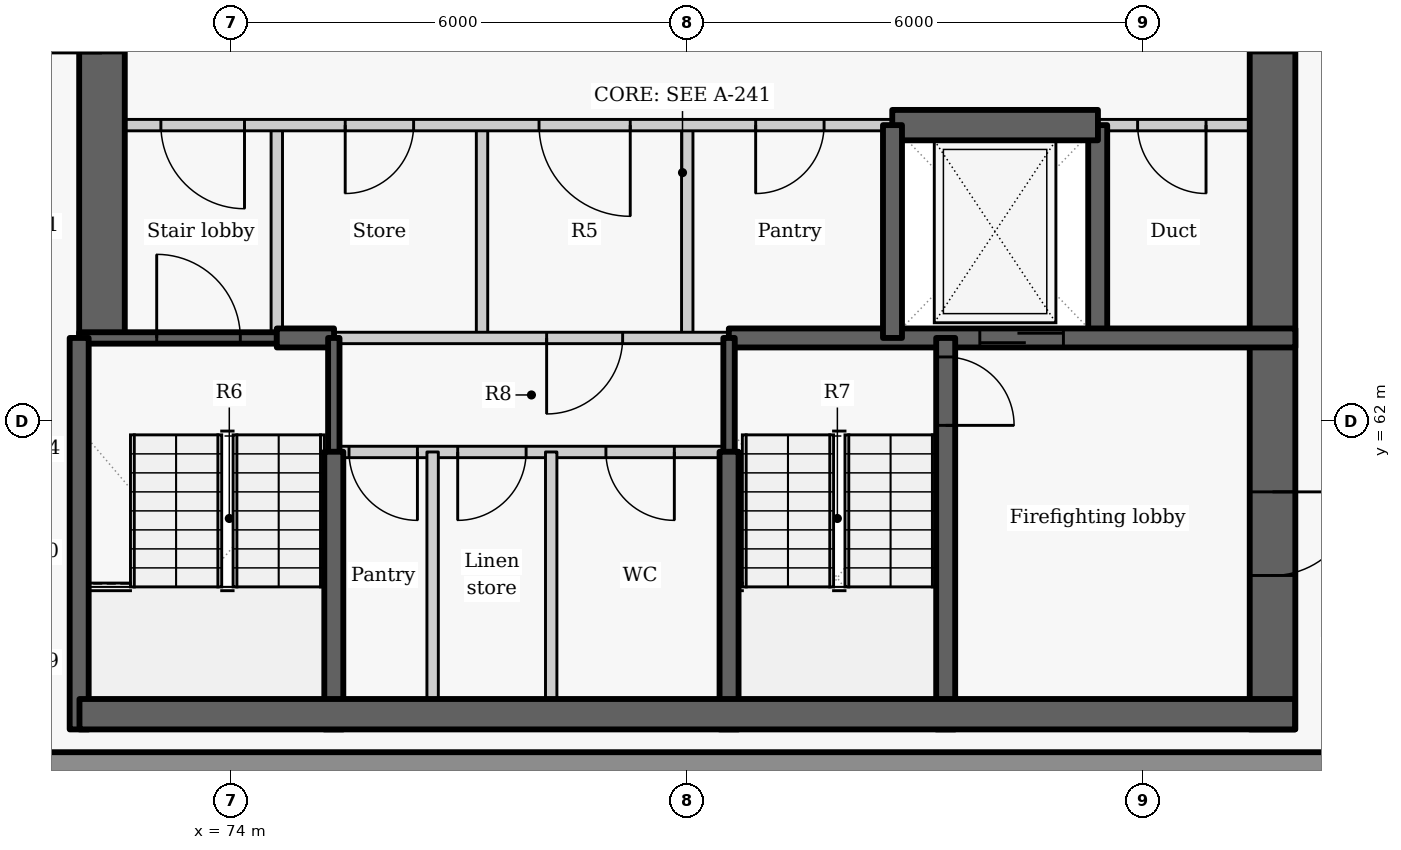
"""IFC4 building model, lengths in metres.
Left out: names, types, materials, properties, quantities, classifications, styles, units other than length and angle.
Written with IfcOpenShell. Run it as: python <this file> out.ifc"""

import sys

from ifc_helpers import new_model, si_unit, direction, frame, frame_2d, origin, place, context, subcontext, project, spatial, rectangle, extrude, element, fill, save


model = new_model("IFC4")
c1 = context("Model", 3, precision=1e-05, world=origin(), true_north=direction((0.0, 1.0)))
c2 = subcontext(c1, "Body", "Model", "MODEL_VIEW")
j1 = project(units=[si_unit("LENGTHUNIT", "METRE"), si_unit("PLANEANGLEUNIT", "RADIAN")], contexts=[c1])
p1 = place(None, origin())
s1 = spatial("IfcSite", under=j1, at=p1, CompositionType="ELEMENT")
p2 = place(p1, origin())
s2 = spatial("IfcBuilding", under=s1, at=p2, CompositionType="ELEMENT")
p3 = place(p2, frame((0.0, 0.0, 239.4)))
s3 = spatial("IfcBuildingStorey", under=s2, at=p3, CompositionType="ELEMENT", Elevation=239.4)
p4 = place(p3, frame((70.501, 57.5, 0.0), z_axis=(0.0, 0.0, 1.0), x_axis=(1.0, 0.0, 0.0)))
e1 = element("IfcWall", 1, at=p4, inside=s3, PredefinedType="SOLIDWALL", context=c2, shape_type="SweptSolid", body=[
    extrude(rectangle(XDim=18.993, YDim=0.3, at=frame_2d((9.496, 0.0))), origin(), (0.0, 0.0, 1.0), 2.425),
])
p5 = place(p3, frame((74.6, 63.1, 0.0), z_axis=(0.0, 0.0, 1.0), x_axis=(0.0, 1.0, 0.0)))
e2 = element("IfcWall", 2, at=p5, inside=s3, PredefinedType="PARTITIONING", context=c2, shape_type="SweptSolid", body=[
    extrude(rectangle(XDim=2.8, YDim=0.15, at=frame_2d((1.4, 0.0))), origin(), (0.0, 0.0, 1.0), 3.025),
])
p6 = place(p3, frame((72.3, 63.1, -0.275), z_axis=(0.0, 0.0, 1.0), x_axis=(0.0, 1.0, 0.0)))
e3 = element("IfcWall", 3, at=p6, inside=s3, PredefinedType="SHEAR", context=c2, shape_type="SweptSolid", body=[
    extrude(rectangle(XDim=9.1, YDim=0.6, at=frame_2d((4.55, 0.0))), origin(), (0.0, 0.0, 1.0), 3.3),
])
p7 = place(p6, frame((3.75, 0.0, 0.275)))
e4 = element("IfcOpeningElement", 4, at=p7, cuts=e3, PredefinedType="OPENING", context=c2, shape_type="SweptSolid", body=[
    extrude(rectangle(XDim=1.5, YDim=2.1, at=frame_2d((0.75, 1.05))), frame((0.0, 0.31, 0.0), z_axis=(0.0, -1.0, 0.0), x_axis=(1.0, 0.0, 0.0)), (0.0, 0.0, 1.0), 0.62),
])
p8 = place(p3, frame((85.4, 63.1, -0.275), z_axis=(0.0, 0.0, 1.0), x_axis=(0.0, 1.0, 0.0)))
e5 = element("IfcWall", 5, at=p8, inside=s3, PredefinedType="SHEAR", context=c2, shape_type="SweptSolid", body=[
    extrude(rectangle(XDim=2.8, YDim=0.25, at=frame_2d((1.4, 0.0))), origin(), (0.0, 0.0, 1.0), 3.3),
])
p9 = place(p3, frame((87.7, 72.2, -0.275), z_axis=(0.0, 0.0, 1.0), x_axis=(0.0, -1.0, 0.0)))
e6 = element("IfcWall", 6, at=p9, inside=s3, PredefinedType="SHEAR", context=c2, shape_type="SweptSolid", body=[
    extrude(rectangle(XDim=14.25, YDim=0.6, at=frame_2d((7.125, 0.0))), origin(), (0.0, 0.0, 1.0), 3.3),
])
p10 = place(p9, frame((3.85, 0.0, 0.275)))
e7 = element("IfcOpeningElement", 7, at=p10, cuts=e6, PredefinedType="OPENING", context=c2, shape_type="SweptSolid", body=[
    extrude(rectangle(XDim=1.5, YDim=2.1, at=frame_2d((0.75, 1.05))), frame((0.0, 0.31, 0.0), z_axis=(0.0, -1.0, 0.0), x_axis=(1.0, 0.0, 0.0)), (0.0, 0.0, 1.0), 0.62),
])
p11 = place(p9, frame((11.125, 0.0, 0.275)))
e8 = element("IfcOpeningElement", 8, at=p11, cuts=e6, PredefinedType="OPENING", context=c2, shape_type="SweptSolid", body=[
    extrude(rectangle(XDim=1.1, YDim=2.1, at=frame_2d((0.55, 1.05))), frame((0.0, 0.31, 0.0), z_axis=(0.0, -1.0, 0.0), x_axis=(1.0, 0.0, 0.0)), (0.0, 0.0, 1.0), 0.62),
])
for number, where, z_axis, x_axis in (
    (9, (77.3, 63.1, 0.0), (0.0, 0.0, 1.0), (0.0, 1.0, 0.0)),
    (10, (80.0, 63.1, 0.0), (0.0, 0.0, 1.0), (0.0, 1.0, 0.0)),
):
    element("IfcWall", number, at=place(p3, frame(where, z_axis=z_axis, x_axis=x_axis)), inside=s3, PredefinedType="PARTITIONING", context=c2, shape_type="SweptSolid", body=[
        extrude(rectangle(XDim=2.8, YDim=0.15, at=frame_2d((1.4, 0.0))), origin(), (0.0, 0.0, 1.0), 3.025),
    ])
p12 = place(p3, frame((82.703, 65.9, 0.0), z_axis=(0.0, 0.0, 1.0), x_axis=(-1.0, 0.0, 0.0)))
e11 = element("IfcWall", 11, at=p12, inside=s3, PredefinedType="PARTITIONING", context=c2, shape_type="SweptSolid", body=[
    extrude(rectangle(XDim=10.703, YDim=0.15, at=frame_2d((5.352, 0.0))), origin(), (0.0, 0.0, 1.0), 3.025),
])
p13 = place(p12, frame((8.528, 0.0, 0.0)))
e12 = element("IfcOpeningElement", 12, at=p13, cuts=e11, PredefinedType="OPENING", context=c2, shape_type="SweptSolid", body=[
    extrude(rectangle(XDim=1.1, YDim=2.1, at=frame_2d((0.55, 1.05))), frame((0.0, 0.085, 0.0), z_axis=(0.0, -1.0, 0.0), x_axis=(1.0, 0.0, 0.0)), (0.0, 0.0, 1.0), 0.17),
])
p14 = place(p12, frame((6.303, 0.0, 0.0)))
e13 = element("IfcOpeningElement", 13, at=p14, cuts=e11, PredefinedType="OPENING", context=c2, shape_type="SweptSolid", body=[
    extrude(rectangle(XDim=0.9, YDim=2.1, at=frame_2d((0.45, 1.05))), frame((0.0, 0.085, 0.0), z_axis=(0.0, -1.0, 0.0), x_axis=(1.0, 0.0, 0.0)), (0.0, 0.0, 1.0), 0.17),
])
p15 = place(p12, frame((3.453, 0.0, 0.0)))
e14 = element("IfcOpeningElement", 14, at=p15, cuts=e11, PredefinedType="OPENING", context=c2, shape_type="SweptSolid", body=[
    extrude(rectangle(XDim=1.2, YDim=2.1, at=frame_2d((0.6, 1.05))), frame((0.0, 0.085, 0.0), z_axis=(0.0, -1.0, 0.0), x_axis=(1.0, 0.0, 0.0)), (0.0, 0.0, 1.0), 0.17),
])
p16 = place(p12, frame((0.903, 0.0, 0.0)))
e15 = element("IfcOpeningElement", 15, at=p16, cuts=e11, PredefinedType="OPENING", context=c2, shape_type="SweptSolid", body=[
    extrude(rectangle(XDim=0.9, YDim=2.1, at=frame_2d((0.45, 1.05))), frame((0.0, 0.085, 0.0), z_axis=(0.0, -1.0, 0.0), x_axis=(1.0, 0.0, 0.0)), (0.0, 0.0, 1.0), 0.17),
])
p17 = place(p3, frame((88.0, 65.9, 0.0), z_axis=(0.0, 0.0, 1.0), x_axis=(-1.0, 0.0, 0.0)))
e16 = element("IfcWall", 16, at=p17, inside=s3, PredefinedType="PARTITIONING", context=c2, shape_type="SweptSolid", body=[
    extrude(rectangle(XDim=2.603, YDim=0.15, at=frame_2d((1.302, 0.0))), origin(), (0.0, 0.0, 1.0), 3.025),
])
p18 = place(p17, frame((1.175, 0.0, 0.0)))
e17 = element("IfcOpeningElement", 17, at=p18, cuts=e16, PredefinedType="OPENING", context=c2, shape_type="SweptSolid", body=[
    extrude(rectangle(XDim=0.9, YDim=2.1, at=frame_2d((0.45, 1.05))), frame((0.0, 0.085, 0.0), z_axis=(0.0, -1.0, 0.0), x_axis=(1.0, 0.0, 0.0)), (0.0, 0.0, 1.0), 0.17),
])
p19 = place(p3, frame((82.697, 65.9, -0.275), z_axis=(0.0, 0.0, 1.0), x_axis=(1.0, 0.0, 0.0)))
e18 = element("IfcWall", 18, at=p19, inside=s3, PredefinedType="SHEAR", context=c2, shape_type="SweptSolid", body=[
    extrude(rectangle(XDim=2.706, YDim=0.4, at=frame_2d((1.353, 0.0))), origin(), (0.0, 0.0, 1.0), 3.3),
])
p20 = place(p3, frame((72.0, 63.1, -0.275), z_axis=(0.0, 0.0, 1.0), x_axis=(1.0, 0.0, 0.0)))
e19 = element("IfcWall", 19, at=p20, inside=s3, PredefinedType="SHEAR", context=c2, shape_type="SweptSolid", body=[
    extrude(rectangle(XDim=2.6, YDim=0.15, at=frame_2d((1.3, 0.0))), origin(), (0.0, 0.0, 1.0), 3.3),
])
p21 = place(p20, frame((1.02, 0.0, 0.275)))
e20 = element("IfcOpeningElement", 20, at=p21, cuts=e19, PredefinedType="OPENING", context=c2, shape_type="SweptSolid", body=[
    extrude(rectangle(XDim=1.1, YDim=2.1, at=frame_2d((0.55, 1.05))), frame((0.0, 0.085, 0.0), z_axis=(0.0, -1.0, 0.0), x_axis=(1.0, 0.0, 0.0)), (0.0, 0.0, 1.0), 0.17),
])
p22 = place(p3, frame((74.6, 63.1, -0.275), z_axis=(0.0, 0.0, 1.0), x_axis=(1.0, 0.0, 0.0)))
e21 = element("IfcWall", 21, at=p22, inside=s3, PredefinedType="SHEAR", context=c2, shape_type="SweptSolid", body=[
    extrude(rectangle(XDim=0.753, YDim=0.25, at=frame_2d((0.376, 0.0))), origin(), (0.0, 0.0, 1.0), 3.3),
])
p23 = place(p3, frame((80.547, 63.1, -0.275), z_axis=(0.0, 0.0, 1.0), x_axis=(1.0, 0.0, 0.0)))
e22 = element("IfcWall", 22, at=p23, inside=s3, PredefinedType="SHEAR", context=c2, shape_type="SweptSolid", body=[
    extrude(rectangle(XDim=7.453, YDim=0.25, at=frame_2d((3.727, 0.0))), origin(), (0.0, 0.0, 1.0), 3.3),
])
p24 = place(p23, frame((3.302, 0.0, 0.275)))
e23 = element("IfcOpeningElement", 23, at=p24, cuts=e22, PredefinedType="OPENING", context=c2, shape_type="SweptSolid", body=[
    extrude(rectangle(XDim=1.1, YDim=2.1, at=frame_2d((0.55, 1.05))), frame((0.0, 0.135, 0.0), z_axis=(0.0, -1.0, 0.0), x_axis=(1.0, 0.0, 0.0)), (0.0, 0.0, 1.0), 0.27),
])
p25 = place(p3, frame((80.553, 63.1, 0.0), z_axis=(0.0, 0.0, 1.0), x_axis=(-1.0, 0.0, 0.0)))
e24 = element("IfcWall", 24, at=p25, inside=s3, PredefinedType="PARTITIONING", context=c2, shape_type="SweptSolid", body=[
    extrude(rectangle(XDim=5.206, YDim=0.15, at=frame_2d((2.603, 0.0))), origin(), (0.0, 0.0, 1.0), 3.025),
])
p26 = place(p25, frame((1.403, 0.0, 0.0)))
e25 = element("IfcOpeningElement", 25, at=p26, cuts=e24, PredefinedType="OPENING", context=c2, shape_type="SweptSolid", body=[
    extrude(rectangle(XDim=1.0, YDim=2.1, at=frame_2d((0.5, 1.05))), frame((0.0, 0.085, 0.0), z_axis=(0.0, -1.0, 0.0), x_axis=(1.0, 0.0, 0.0)), (0.0, 0.0, 1.0), 0.17),
])
p27 = place(p3, frame((82.7, 63.1, -0.275), z_axis=(0.0, 0.0, 1.0), x_axis=(0.0, 1.0, 0.0)))
e26 = element("IfcWall", 26, at=p27, inside=s3, PredefinedType="SHEAR", context=c2, shape_type="SweptSolid", body=[
    extrude(rectangle(XDim=2.8, YDim=0.25, at=frame_2d((1.4, 0.0))), origin(), (0.0, 0.0, 1.0), 3.3),
])
p28 = place(p3, frame((75.35, 61.597, -0.275), z_axis=(0.0, 0.0, 1.0), x_axis=(0.0, 1.0, 0.0)))
e27 = element("IfcWall", 27, at=p28, inside=s3, PredefinedType="SHEAR", context=c2, shape_type="SweptSolid", body=[
    extrude(rectangle(XDim=1.503, YDim=0.15, at=frame_2d((0.751, 0.0))), origin(), (0.0, 0.0, 1.0), 3.3),
])
p29 = place(p3, frame((75.35, 57.95, -0.275), z_axis=(0.0, 0.0, 1.0), x_axis=(0.0, 1.0, 0.0)))
e28 = element("IfcWall", 28, at=p29, inside=s3, PredefinedType="SHEAR", context=c2, shape_type="SweptSolid", body=[
    extrude(rectangle(XDim=3.653, YDim=0.25, at=frame_2d((1.827, 0.0))), origin(), (0.0, 0.0, 1.0), 3.3),
])
p30 = place(p3, frame((72.0, 57.95, -0.275), z_axis=(0.0, 0.0, 1.0), x_axis=(0.0, 1.0, 0.0)))
e29 = element("IfcWall", 29, at=p30, inside=s3, PredefinedType="SHEAR", context=c2, shape_type="SweptSolid", body=[
    extrude(rectangle(XDim=5.15, YDim=0.25, at=frame_2d((2.575, 0.0))), origin(), (0.0, 0.0, 1.0), 3.3),
])
p31 = place(p3, frame((83.4, 63.1, -0.275), z_axis=(0.0, 0.0, 1.0), x_axis=(0.0, -1.0, 0.0)))
e30 = element("IfcWall", 30, at=p31, inside=s3, PredefinedType="SHEAR", context=c2, shape_type="SweptSolid", body=[
    extrude(rectangle(XDim=5.15, YDim=0.25, at=frame_2d((2.575, 0.0))), origin(), (0.0, 0.0, 1.0), 3.3),
])
p32 = place(p31, frame((0.25, 0.0, 0.275)))
e31 = element("IfcOpeningElement", 31, at=p32, cuts=e30, PredefinedType="OPENING", context=c2, shape_type="SweptSolid", body=[
    extrude(rectangle(XDim=0.9, YDim=2.1, at=frame_2d((0.45, 1.05))), frame((0.0, 0.135, 0.0), z_axis=(0.0, -1.0, 0.0), x_axis=(1.0, 0.0, 0.0)), (0.0, 0.0, 1.0), 0.27),
])
p33 = place(p3, frame((80.55, 61.597, -0.275), z_axis=(0.0, 0.0, 1.0), x_axis=(0.0, 1.0, 0.0)))
e32 = element("IfcWall", 32, at=p33, inside=s3, PredefinedType="SHEAR", context=c2, shape_type="SweptSolid", body=[
    extrude(rectangle(XDim=1.503, YDim=0.15, at=frame_2d((0.751, 0.0))), origin(), (0.0, 0.0, 1.0), 3.3),
])
p34 = place(p3, frame((80.55, 57.95, -0.275), z_axis=(0.0, 0.0, 1.0), x_axis=(0.0, 1.0, 0.0)))
e33 = element("IfcWall", 33, at=p34, inside=s3, PredefinedType="SHEAR", context=c2, shape_type="SweptSolid", body=[
    extrude(rectangle(XDim=3.653, YDim=0.25, at=frame_2d((1.827, 0.0))), origin(), (0.0, 0.0, 1.0), 3.3),
])
p35 = place(p3, frame((80.55, 61.6, 0.0), z_axis=(0.0, 0.0, 1.0), x_axis=(-1.0, 0.0, 0.0)))
e34 = element("IfcWall", 34, at=p35, inside=s3, PredefinedType="PARTITIONING", context=c2, shape_type="SweptSolid", body=[
    extrude(rectangle(XDim=5.2, YDim=0.15, at=frame_2d((2.6, 0.0))), origin(), (0.0, 0.0, 1.0), 3.025),
])
p36 = place(p35, frame((4.1, 0.0, 0.0)))
e35 = element("IfcOpeningElement", 35, at=p36, cuts=e34, PredefinedType="OPENING", context=c2, shape_type="SweptSolid", body=[
    extrude(rectangle(XDim=0.9, YDim=2.1, at=frame_2d((0.45, 1.05))), frame((0.0, 0.085, 0.0), z_axis=(0.0, -1.0, 0.0), x_axis=(1.0, 0.0, 0.0)), (0.0, 0.0, 1.0), 0.17),
])
p37 = place(p35, frame((2.67, 0.0, 0.0)))
e36 = element("IfcOpeningElement", 36, at=p37, cuts=e34, PredefinedType="OPENING", context=c2, shape_type="SweptSolid", body=[
    extrude(rectangle(XDim=0.9, YDim=2.1, at=frame_2d((0.45, 1.05))), frame((0.0, 0.085, 0.0), z_axis=(0.0, -1.0, 0.0), x_axis=(1.0, 0.0, 0.0)), (0.0, 0.0, 1.0), 0.17),
])
p38 = place(p35, frame((0.72, 0.0, 0.0)))
e37 = element("IfcOpeningElement", 37, at=p38, cuts=e34, PredefinedType="OPENING", context=c2, shape_type="SweptSolid", body=[
    extrude(rectangle(XDim=0.9, YDim=2.1, at=frame_2d((0.45, 1.05))), frame((0.0, 0.085, 0.0), z_axis=(0.0, -1.0, 0.0), x_axis=(1.0, 0.0, 0.0)), (0.0, 0.0, 1.0), 0.17),
])
for number, where, z_axis, x_axis in (
    (38, (76.65, 57.95, 0.0), (0.0, 0.0, 1.0), (0.0, 1.0, 0.0)),
    (39, (78.21, 57.95, 0.0), (0.0, 0.0, 1.0), (0.0, 1.0, 0.0)),
):
    element("IfcWall", number, at=place(p3, frame(where, z_axis=z_axis, x_axis=x_axis)), inside=s3, PredefinedType="PARTITIONING", context=c2, shape_type="SweptSolid", body=[
        extrude(rectangle(XDim=3.65, YDim=0.15, at=frame_2d((1.825, 0.0))), origin(), (0.0, 0.0, 1.0), 3.025),
    ])
p39 = place(p3, frame((72.004, 58.15, -0.275), z_axis=(0.0, 0.0, 1.0), x_axis=(1.0, 0.0, 0.0)))
e40 = element("IfcWall", 40, at=p39, inside=s3, PredefinedType="SHEAR", context=c2, shape_type="SweptSolid", body=[
    extrude(rectangle(XDim=15.992, YDim=0.4, at=frame_2d((7.996, 0.0))), origin(), (0.0, 0.0, 1.0), 3.3),
])
p40 = place(p13, origin())
e41 = element("IfcDoor", 41, at=p40, inside=s3, OperationType="SINGLE_SWING_LEFT", PredefinedType="DOOR", context=c2, shape_type="SweptSolid", body=[
    extrude(rectangle(XDim=1.1, YDim=2.1, at=frame_2d((0.55, 1.05))), frame((0.0, 0.025, 0.0), z_axis=(0.0, -1.0, 0.0), x_axis=(1.0, 0.0, 0.0)), (0.0, 0.0, 1.0), 0.05),
])
fill(e12, e41)
p41 = place(p14, origin())
e42 = element("IfcDoor", 42, at=p41, inside=s3, OperationType="SINGLE_SWING_RIGHT", PredefinedType="DOOR", context=c2, shape_type="SweptSolid", body=[
    extrude(rectangle(XDim=0.9, YDim=2.1, at=frame_2d((0.45, 1.05))), frame((0.0, 0.025, 0.0), z_axis=(0.0, -1.0, 0.0), x_axis=(1.0, 0.0, 0.0)), (0.0, 0.0, 1.0), 0.05),
])
fill(e13, e42)
p42 = place(p15, origin())
e43 = element("IfcDoor", 43, at=p42, inside=s3, OperationType="DOUBLE_DOOR_SINGLE_SWING", PredefinedType="DOOR", context=c2, shape_type="SweptSolid", body=[
    extrude(rectangle(XDim=1.2, YDim=2.1, at=frame_2d((0.6, 1.05))), frame((0.0, 0.025, 0.0), z_axis=(0.0, -1.0, 0.0), x_axis=(1.0, 0.0, 0.0)), (0.0, 0.0, 1.0), 0.05),
])
fill(e14, e43)
p43 = place(p16, origin())
e44 = element("IfcDoor", 44, at=p43, inside=s3, OperationType="SINGLE_SWING_RIGHT", PredefinedType="DOOR", context=c2, shape_type="SweptSolid", body=[
    extrude(rectangle(XDim=0.9, YDim=2.1, at=frame_2d((0.45, 1.05))), frame((0.0, 0.025, 0.0), z_axis=(0.0, -1.0, 0.0), x_axis=(1.0, 0.0, 0.0)), (0.0, 0.0, 1.0), 0.05),
])
fill(e15, e44)
p44 = place(p24, origin())
e45 = element("IfcDoor", 45, at=p44, inside=s3, OperationType="SLIDING_TO_LEFT", PredefinedType="DOOR", context=c2, shape_type="SweptSolid", body=[
    extrude(rectangle(XDim=1.1, YDim=2.1, at=frame_2d((0.55, 1.05))), frame((0.0, 0.025, 0.0), z_axis=(0.0, -1.0, 0.0), x_axis=(1.0, 0.0, 0.0)), (0.0, 0.0, 1.0), 0.05),
])
fill(e23, e45)
p45 = place(p18, origin())
e46 = element("IfcDoor", 46, at=p45, inside=s3, OperationType="SINGLE_SWING_LEFT", PredefinedType="DOOR", context=c2, shape_type="SweptSolid", body=[
    extrude(rectangle(XDim=0.9, YDim=2.1, at=frame_2d((0.45, 1.05))), frame((0.0, 0.025, 0.0), z_axis=(0.0, -1.0, 0.0), x_axis=(1.0, 0.0, 0.0)), (0.0, 0.0, 1.0), 0.05),
])
fill(e17, e46)
p46 = place(p26, origin())
e47 = element("IfcDoor", 47, at=p46, inside=s3, OperationType="SINGLE_SWING_RIGHT", PredefinedType="DOOR", context=c2, shape_type="SweptSolid", body=[
    extrude(rectangle(XDim=1.0, YDim=2.1, at=frame_2d((0.5, 1.05))), frame((0.0, 0.025, 0.0), z_axis=(0.0, -1.0, 0.0), x_axis=(1.0, 0.0, 0.0)), (0.0, 0.0, 1.0), 0.05),
])
fill(e25, e47)
p47 = place(p36, origin())
e48 = element("IfcDoor", 48, at=p47, inside=s3, OperationType="SINGLE_SWING_LEFT", PredefinedType="DOOR", context=c2, shape_type="SweptSolid", body=[
    extrude(rectangle(XDim=0.9, YDim=2.1, at=frame_2d((0.45, 1.05))), frame((0.0, 0.025, 0.0), z_axis=(0.0, -1.0, 0.0), x_axis=(1.0, 0.0, 0.0)), (0.0, 0.0, 1.0), 0.05),
])
fill(e35, e48)
p48 = place(p37, origin())
e49 = element("IfcDoor", 49, at=p48, inside=s3, OperationType="SINGLE_SWING_RIGHT", PredefinedType="DOOR", context=c2, shape_type="SweptSolid", body=[
    extrude(rectangle(XDim=0.9, YDim=2.1, at=frame_2d((0.45, 1.05))), frame((0.0, 0.025, 0.0), z_axis=(0.0, -1.0, 0.0), x_axis=(1.0, 0.0, 0.0)), (0.0, 0.0, 1.0), 0.05),
])
fill(e36, e49)
p49 = place(p38, origin())
e50 = element("IfcDoor", 50, at=p49, inside=s3, OperationType="SINGLE_SWING_LEFT", PredefinedType="DOOR", context=c2, shape_type="SweptSolid", body=[
    extrude(rectangle(XDim=0.9, YDim=2.1, at=frame_2d((0.45, 1.05))), frame((0.0, 0.025, 0.0), z_axis=(0.0, -1.0, 0.0), x_axis=(1.0, 0.0, 0.0)), (0.0, 0.0, 1.0), 0.05),
])
fill(e37, e50)
p50 = place(p21, origin())
e51 = element("IfcDoor", 51, at=p50, inside=s3, OperationType="SINGLE_SWING_LEFT", PredefinedType="DOOR", context=c2, shape_type="SweptSolid", body=[
    extrude(rectangle(XDim=1.1, YDim=2.1, at=frame_2d((0.55, 1.05))), frame((0.0, 0.025, 0.0), z_axis=(0.0, -1.0, 0.0), x_axis=(1.0, 0.0, 0.0)), (0.0, 0.0, 1.0), 0.05),
])
fill(e20, e51)
p51 = place(p32, origin())
e52 = element("IfcDoor", 52, at=p51, inside=s3, OperationType="SINGLE_SWING_RIGHT", PredefinedType="DOOR", context=c2, shape_type="SweptSolid", body=[
    extrude(rectangle(XDim=0.9, YDim=2.1, at=frame_2d((0.45, 1.05))), frame((0.0, 0.025, 0.0), z_axis=(0.0, -1.0, 0.0), x_axis=(1.0, 0.0, 0.0)), (0.0, 0.0, 1.0), 0.05),
])
fill(e31, e52)
p52 = place(p10, origin())
e53 = element("IfcDoor", 53, at=p52, inside=s3, OperationType="DOUBLE_DOOR_SINGLE_SWING", PredefinedType="DOOR", context=c2, shape_type="SweptSolid", body=[
    extrude(rectangle(XDim=1.5, YDim=2.1, at=frame_2d((0.75, 1.05))), frame((0.0, 0.025, 0.0), z_axis=(0.0, -1.0, 0.0), x_axis=(1.0, 0.0, 0.0)), (0.0, 0.0, 1.0), 0.05),
])
fill(e7, e53)
p53 = place(p11, origin())
e54 = element("IfcDoor", 54, at=p53, inside=s3, OperationType="SINGLE_SWING_LEFT", PredefinedType="DOOR", context=c2, shape_type="SweptSolid", body=[
    extrude(rectangle(XDim=1.1, YDim=2.1, at=frame_2d((0.55, 1.05))), frame((0.0, 0.025, 0.0), z_axis=(0.0, -1.0, 0.0), x_axis=(1.0, 0.0, 0.0)), (0.0, 0.0, 1.0), 0.05),
])
fill(e8, e54)
save(model, sys.argv[1])
